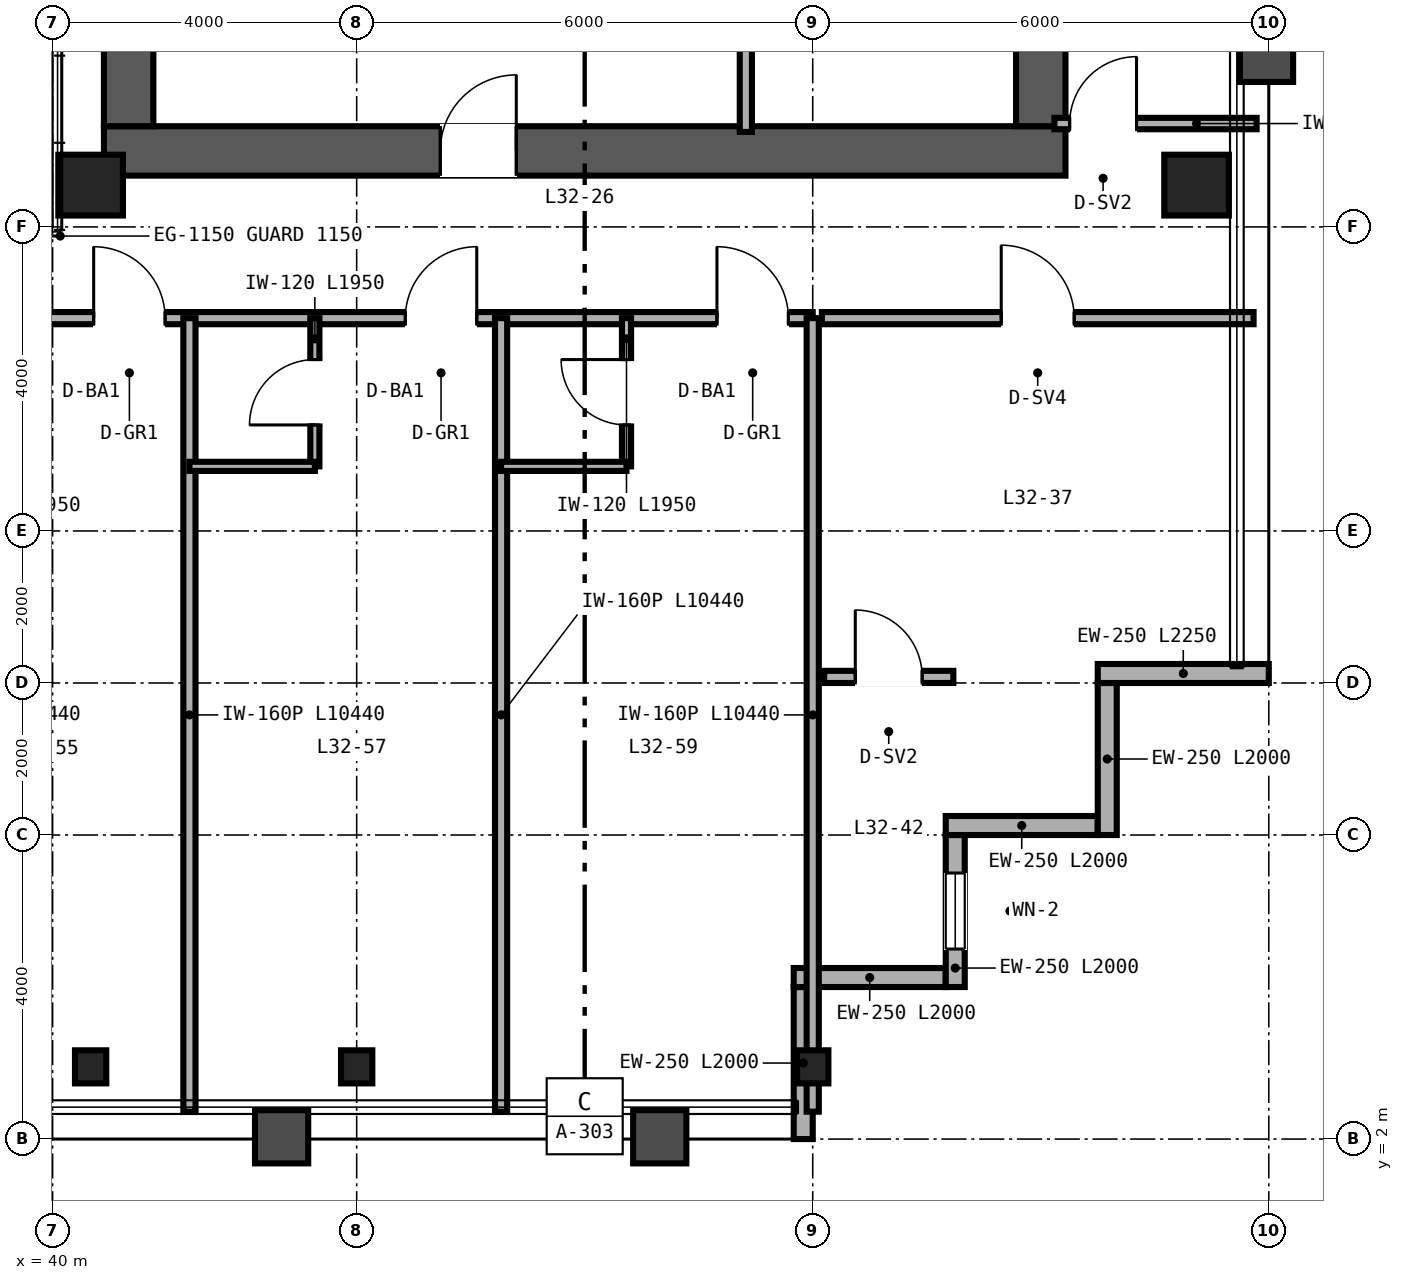
"""IFC4 building model, lengths in metres.
Left out: names, types, materials, properties, quantities, classifications, styles, units other than length and angle.
Written with IfcOpenShell. Run it as: python <this file> out.ifc"""

import sys

from ifc_helpers import new_model, si_unit, direction, frame, frame_2d, origin, origin_2d, place, context, subcontext, project, spatial, rectangle, hollow_rectangle, i_section, extrude, source, transform, mapped, element, fill, save


model = new_model("IFC4")
c1 = context("Model", 3, precision=1e-05, world=origin(), true_north=direction((0.0, 1.0)))
c2 = subcontext(c1, "Body", "Model", "MODEL_VIEW")
j1 = project(units=[si_unit("LENGTHUNIT", "METRE"), si_unit("PLANEANGLEUNIT", "RADIAN")], contexts=[c1])
p1 = place(None, origin())
s1 = spatial("IfcSite", under=j1, at=p1, CompositionType="ELEMENT")
p2 = place(p1, origin())
s2 = spatial("IfcBuilding", under=s1, at=p2, CompositionType="ELEMENT")
p3 = place(p2, frame((0.0, 0.0, 129.6)))
s3 = spatial("IfcBuildingStorey", under=s2, at=p3, CompositionType="ELEMENT", Elevation=129.6)
p4 = place(p3, frame((40.675, 15.0, 0.0), z_axis=(0.0, 0.0, 1.0), x_axis=(1.0, 0.0, 0.0)))
e1 = element("IfcWall", 1, at=p4, inside=s3, PredefinedType="SHEAR", context=c2, shape_type="SweptSolid", body=[
    extrude(rectangle(XDim=12.65, YDim=0.65, at=frame_2d((6.325, 0.0))), origin(), (0.0, 0.0, 1.0), 3.36),
])
p5 = place(p4, frame((4.425, 0.0, 0.0)))
e2 = element("IfcOpeningElement", 2, at=p5, cuts=e1, PredefinedType="OPENING", context=c2, shape_type="SweptSolid", body=[
    extrude(rectangle(XDim=1.0, YDim=2.15, at=frame_2d((0.5, 1.075))), frame((0.0, 0.335, 0.0), z_axis=(0.0, -1.0, 0.0), x_axis=(1.0, 0.0, 0.0)), (0.0, 0.0, 1.0), 0.67),
])
for number, where, z_axis, x_axis in (
    (3, (41.0, 15.325, 0.0), (0.0, 0.0, 1.0), (0.0, 1.0, 0.0)),
    (4, (53.0, 15.325, 0.0), (0.0, 0.0, 1.0), (0.0, 1.0, 0.0)),
):
    element("IfcWall", number, at=place(p3, frame(where, z_axis=z_axis, x_axis=x_axis)), inside=s3, PredefinedType="SHEAR", context=c2, shape_type="SweptSolid", body=[
        extrude(rectangle(XDim=21.35, YDim=0.65, at=frame_2d((10.675, 0.0))), origin(), (0.0, 0.0, 1.0), 3.36),
    ])
m1 = source(origin(), c2, "Body", "SweptSolid", [
    extrude(hollow_rectangle(XDim=0.85, YDim=0.8, WallThickness=0.032, at=origin_2d()), origin(), (0.0, 0.0, 1.0), 3.36),
])
for number, where, z_axis, x_axis in (
    (5, (40.5, 14.55, 0.0), (0.0, 0.0, 1.0), (1.0, 0.0, 0.0)),
    (6, (55.05, 14.55, 0.0), (0.0, 0.0, 1.0), (1.0, 0.0, 0.0)),
):
    element("IfcColumn", number, at=place(p3, frame(where, z_axis=z_axis, x_axis=x_axis)), inside=s3, PredefinedType="COLUMN", context=c2, shape_type="MappedRepresentation", body=[
        mapped(m1, transform((0.0, 0.0, 0.0), scale=1.0)),
    ])
m2 = source(origin(), c2, "Body", "SweptSolid", [
    extrude(i_section(OverallWidth=0.412, OverallDepth=0.435, WebThickness=0.036, FlangeThickness=0.057, FilletRadius=0.025, at=origin_2d()), origin(), (0.0, 0.0, 1.0), 3.36),
])
for number, where, z_axis, x_axis in (
    (7, (40.5, 2.95, 0.0), (0.0, 0.0, 1.0), (1.0, 0.0, 0.0)),
    (8, (44.0, 2.95, 0.0), (0.0, 0.0, 1.0), (1.0, 0.0, 0.0)),
    (9, (50.0, 2.95, 0.0), (0.0, 0.0, 1.0), (1.0, 0.0, 0.0)),
):
    element("IfcColumn", number, at=place(p3, frame(where, z_axis=z_axis, x_axis=x_axis)), inside=s3, PredefinedType="COLUMN", context=c2, shape_type="MappedRepresentation", body=[
        mapped(m2, transform((0.0, 0.0, 0.0), scale=1.0)),
    ])
p6 = place(p3, frame((49.875, 2.0, 0.0), z_axis=(0.0, 0.0, 1.0), x_axis=(0.0, 1.0, 0.0)))
e10 = element("IfcWall", 10, at=p6, inside=s3, PredefinedType="SOLIDWALL", context=c2, shape_type="SweptSolid", body=[
    extrude(rectangle(XDim=2.0, YDim=0.25, at=frame_2d((1.0, 0.0))), origin(), (0.0, 0.0, 1.0), 2.667),
])
p7 = place(p3, frame((49.75, 4.125, 0.0), z_axis=(0.0, 0.0, 1.0), x_axis=(1.0, 0.0, 0.0)))
e11 = element("IfcWall", 11, at=p7, inside=s3, PredefinedType="SOLIDWALL", context=c2, shape_type="SweptSolid", body=[
    extrude(rectangle(XDim=2.0, YDim=0.25, at=frame_2d((1.0, 0.0))), origin(), (0.0, 0.0, 1.0), 3.36),
])
p8 = place(p3, frame((51.875, 4.0, 0.0), z_axis=(0.0, 0.0, 1.0), x_axis=(0.0, 1.0, 0.0)))
e12 = element("IfcWall", 12, at=p8, inside=s3, PredefinedType="SOLIDWALL", context=c2, shape_type="SweptSolid", body=[
    extrude(rectangle(XDim=2.0, YDim=0.25, at=frame_2d((1.0, 0.0))), origin(), (0.0, 0.0, 1.0), 3.36),
])
p9 = place(p8, frame((0.5, 0.0, 0.85)))
e13 = element("IfcOpeningElement", 13, at=p9, cuts=e12, PredefinedType="OPENING", context=c2, shape_type="SweptSolid", body=[
    extrude(rectangle(XDim=1.0, YDim=1.9, at=frame_2d((0.5, 0.95))), frame((0.0, 0.135, 0.0), z_axis=(0.0, -1.0, 0.0), x_axis=(1.0, 0.0, 0.0)), (0.0, 0.0, 1.0), 0.27),
])
for number, where, z_axis, x_axis in (
    (14, (51.75, 6.125, 0.0), (0.0, 0.0, 1.0), (1.0, 0.0, 0.0)),
    (15, (53.875, 6.0, 0.0), (0.0, 0.0, 1.0), (0.0, 1.0, 0.0)),
):
    element("IfcWall", number, at=place(p3, frame(where, z_axis=z_axis, x_axis=x_axis)), inside=s3, PredefinedType="SOLIDWALL", context=c2, shape_type="SweptSolid", body=[
        extrude(rectangle(XDim=2.0, YDim=0.25, at=frame_2d((1.0, 0.0))), origin(), (0.0, 0.0, 1.0), 3.36),
    ])
p10 = place(p3, frame((53.75, 8.125, 0.0), z_axis=(0.0, 0.0, 1.0), x_axis=(1.0, 0.0, 0.0)))
e16 = element("IfcWall", 16, at=p10, inside=s3, PredefinedType="SOLIDWALL", context=c2, shape_type="SweptSolid", body=[
    extrude(rectangle(XDim=2.25, YDim=0.25, at=frame_2d((1.125, 0.0))), origin(), (0.0, 0.0, 1.0), 3.36),
])
p11 = place(p3, frame((49.12, 15.25, 0.0), z_axis=(0.0, 0.0, 1.0), x_axis=(0.0, 1.0, 0.0)))
e17 = element("IfcWall", 17, at=p11, inside=s3, PredefinedType="PARTITIONING", context=c2, shape_type="SweptSolid", body=[
    extrude(rectangle(XDim=16.13, YDim=0.16, at=frame_2d((8.065, 0.0))), origin(), (0.0, 0.0, 1.0), 2.36),
])
p12 = place(p11, frame((4.0, 0.0, 0.0)))
e18 = element("IfcOpeningElement", 18, at=p12, cuts=e17, PredefinedType="OPENING", context=c2, shape_type="SweptSolid", body=[
    extrude(rectangle(XDim=0.92, YDim=2.15, at=frame_2d((0.46, 1.075))), frame((0.0, 0.09, 0.0), z_axis=(0.0, -1.0, 0.0), x_axis=(1.0, 0.0, 0.0)), (0.0, 0.0, 1.0), 0.18),
])
p13 = place(p11, frame((12.0, 0.0, 0.0)))
e19 = element("IfcOpeningElement", 19, at=p13, cuts=e17, PredefinedType="OPENING", context=c2, shape_type="SweptSolid", body=[
    extrude(rectangle(XDim=0.92, YDim=2.15, at=frame_2d((0.46, 1.075))), frame((0.0, 0.09, 0.0), z_axis=(0.0, -1.0, 0.0), x_axis=(1.0, 0.0, 0.0)), (0.0, 0.0, 1.0), 0.18),
])
p14 = place(p3, frame((53.18, 15.36, 0.0), z_axis=(0.0, 0.0, 1.0), x_axis=(1.0, 0.0, 0.0)))
e20 = element("IfcWall", 20, at=p14, inside=s3, PredefinedType="PARTITIONING", context=c2, shape_type="SweptSolid", body=[
    extrude(rectangle(XDim=2.66, YDim=0.15, at=frame_2d((1.33, 0.0))), origin(), (0.0, 0.0, 1.0), 2.581),
])
p15 = place(p14, frame((0.2, 0.0, 0.0)))
e21 = element("IfcOpeningElement", 21, at=p15, cuts=e20, PredefinedType="OPENING", context=c2, shape_type="SweptSolid", body=[
    extrude(rectangle(XDim=0.88, YDim=2.15, at=frame_2d((0.44, 1.075))), frame((0.0, 0.085, 0.0), z_axis=(0.0, -1.0, 0.0), x_axis=(1.0, 0.0, 0.0)), (0.0, 0.0, 1.0), 0.17),
])
p16 = place(p3, frame((50.12, 12.8, 0.0), z_axis=(0.0, 0.0, 1.0), x_axis=(1.0, 0.0, 0.0)))
e22 = element("IfcWall", 22, at=p16, inside=s3, PredefinedType="PARTITIONING", context=c2, shape_type="SweptSolid", body=[
    extrude(rectangle(XDim=5.68, YDim=0.16, at=frame_2d((2.84, 0.0))), origin(), (0.0, 0.0, 1.0), 3.36),
])
p17 = place(p16, frame((2.36, 0.0, 0.0)))
e23 = element("IfcOpeningElement", 23, at=p17, cuts=e22, PredefinedType="OPENING", context=c2, shape_type="SweptSolid", body=[
    extrude(rectangle(XDim=0.96, YDim=2.15, at=frame_2d((0.48, 1.075))), frame((0.0, 0.09, 0.0), z_axis=(0.0, -1.0, 0.0), x_axis=(1.0, 0.0, 0.0)), (0.0, 0.0, 1.0), 0.18),
])
p18 = place(p3, frame((50.15, 8.08, 0.0), z_axis=(0.0, 0.0, 1.0), x_axis=(1.0, 0.0, 0.0)))
e24 = element("IfcWall", 24, at=p18, inside=s3, PredefinedType="PARTITIONING", context=c2, shape_type="SweptSolid", body=[
    extrude(rectangle(XDim=1.7, YDim=0.16, at=frame_2d((0.85, 0.0))), origin(), (0.0, 0.0, 1.0), 3.36),
])
p19 = place(p18, frame((0.41, 0.0, 0.0)))
e25 = element("IfcOpeningElement", 25, at=p19, cuts=e24, PredefinedType="OPENING", context=c2, shape_type="SweptSolid", body=[
    extrude(rectangle(XDim=0.88, YDim=2.15, at=frame_2d((0.44, 1.075))), frame((0.0, 0.09, 0.0), z_axis=(0.0, -1.0, 0.0), x_axis=(1.0, 0.0, 0.0)), (0.0, 0.0, 1.0), 0.18),
])
p20 = place(p3, frame((14.0, 12.8, 0.0), z_axis=(0.0, 0.0, 1.0), x_axis=(1.0, 0.0, 0.0)))
e26 = element("IfcWall", 26, at=p20, inside=s3, PredefinedType="PARTITIONING", context=c2, shape_type="SweptSolid", body=[
    extrude(rectangle(XDim=36.0, YDim=0.16, at=frame_2d((18.0, 0.0))), origin(), (0.0, 0.0, 1.0), 2.581),
])
p21 = place(p20, frame((2.64, 0.0, 0.0)))
e27 = element("IfcOpeningElement", 27, at=p21, cuts=e26, PredefinedType="OPENING", context=c2, shape_type="SweptSolid", body=[
    extrude(rectangle(XDim=0.94, YDim=2.15, at=frame_2d((0.47, 1.075))), frame((0.0, 0.09, 0.0), z_axis=(0.0, -1.0, 0.0), x_axis=(1.0, 0.0, 0.0)), (0.0, 0.0, 1.0), 0.18),
])
p22 = place(p20, frame((6.54, 0.0, 0.0)))
e28 = element("IfcOpeningElement", 28, at=p22, cuts=e26, PredefinedType="OPENING", context=c2, shape_type="SweptSolid", body=[
    extrude(rectangle(XDim=0.94, YDim=2.15, at=frame_2d((0.47, 1.075))), frame((0.0, 0.09, 0.0), z_axis=(0.0, -1.0, 0.0), x_axis=(1.0, 0.0, 0.0)), (0.0, 0.0, 1.0), 0.18),
])
p23 = place(p20, frame((10.54, 0.0, 0.0)))
e29 = element("IfcOpeningElement", 29, at=p23, cuts=e26, PredefinedType="OPENING", context=c2, shape_type="SweptSolid", body=[
    extrude(rectangle(XDim=0.94, YDim=2.15, at=frame_2d((0.47, 1.075))), frame((0.0, 0.09, 0.0), z_axis=(0.0, -1.0, 0.0), x_axis=(1.0, 0.0, 0.0)), (0.0, 0.0, 1.0), 0.18),
])
p24 = place(p20, frame((14.54, 0.0, 0.0)))
e30 = element("IfcOpeningElement", 30, at=p24, cuts=e26, PredefinedType="OPENING", context=c2, shape_type="SweptSolid", body=[
    extrude(rectangle(XDim=0.94, YDim=2.15, at=frame_2d((0.47, 1.075))), frame((0.0, 0.09, 0.0), z_axis=(0.0, -1.0, 0.0), x_axis=(1.0, 0.0, 0.0)), (0.0, 0.0, 1.0), 0.18),
])
p25 = place(p20, frame((18.54, 0.0, 0.0)))
e31 = element("IfcOpeningElement", 31, at=p25, cuts=e26, PredefinedType="OPENING", context=c2, shape_type="SweptSolid", body=[
    extrude(rectangle(XDim=0.94, YDim=2.15, at=frame_2d((0.47, 1.075))), frame((0.0, 0.09, 0.0), z_axis=(0.0, -1.0, 0.0), x_axis=(1.0, 0.0, 0.0)), (0.0, 0.0, 1.0), 0.18),
])
p26 = place(p20, frame((22.54, 0.0, 0.0)))
e32 = element("IfcOpeningElement", 32, at=p26, cuts=e26, PredefinedType="OPENING", context=c2, shape_type="SweptSolid", body=[
    extrude(rectangle(XDim=0.94, YDim=2.15, at=frame_2d((0.47, 1.075))), frame((0.0, 0.09, 0.0), z_axis=(0.0, -1.0, 0.0), x_axis=(1.0, 0.0, 0.0)), (0.0, 0.0, 1.0), 0.18),
])
p27 = place(p20, frame((26.54, 0.0, 0.0)))
e33 = element("IfcOpeningElement", 33, at=p27, cuts=e26, PredefinedType="OPENING", context=c2, shape_type="SweptSolid", body=[
    extrude(rectangle(XDim=0.94, YDim=2.15, at=frame_2d((0.47, 1.075))), frame((0.0, 0.09, 0.0), z_axis=(0.0, -1.0, 0.0), x_axis=(1.0, 0.0, 0.0)), (0.0, 0.0, 1.0), 0.18),
])
p28 = place(p20, frame((30.64, 0.0, 0.0)))
e34 = element("IfcOpeningElement", 34, at=p28, cuts=e26, PredefinedType="OPENING", context=c2, shape_type="SweptSolid", body=[
    extrude(rectangle(XDim=0.94, YDim=2.15, at=frame_2d((0.47, 1.075))), frame((0.0, 0.09, 0.0), z_axis=(0.0, -1.0, 0.0), x_axis=(1.0, 0.0, 0.0)), (0.0, 0.0, 1.0), 0.18),
])
p29 = place(p20, frame((34.74, 0.0, 0.0)))
e35 = element("IfcOpeningElement", 35, at=p29, cuts=e26, PredefinedType="OPENING", context=c2, shape_type="SweptSolid", body=[
    extrude(rectangle(XDim=0.94, YDim=2.15, at=frame_2d((0.47, 1.075))), frame((0.0, 0.09, 0.0), z_axis=(0.0, -1.0, 0.0), x_axis=(1.0, 0.0, 0.0)), (0.0, 0.0, 1.0), 0.18),
])
p30 = place(p3, frame((50.0, 2.36, 0.0), z_axis=(0.0, 0.0, 1.0), x_axis=(0.0, 1.0, 0.0)))
e36 = element("IfcWall", 36, at=p30, inside=s3, PredefinedType="PARTITIONING", context=c2, shape_type="SweptSolid", body=[
    extrude(rectangle(XDim=10.44, YDim=0.16, at=frame_2d((5.22, 0.0))), origin(), (0.0, 0.0, 1.0), 2.667),
])
p31 = place(p3, frame((41.8, 2.36, 0.0), z_axis=(0.0, 0.0, 1.0), x_axis=(0.0, 1.0, 0.0)))
e37 = element("IfcWall", 37, at=p31, inside=s3, PredefinedType="PARTITIONING", context=c2, shape_type="SweptSolid", body=[
    extrude(rectangle(XDim=10.44, YDim=0.16, at=frame_2d((5.22, 0.0))), origin(), (0.0, 0.0, 1.0), 2.823),
])
p32 = place(p3, frame((45.9, 2.36, 0.0), z_axis=(0.0, 0.0, 1.0), x_axis=(0.0, 1.0, 0.0)))
e38 = element("IfcWall", 38, at=p32, inside=s3, PredefinedType="PARTITIONING", context=c2, shape_type="SweptSolid", body=[
    extrude(rectangle(XDim=10.44, YDim=0.16, at=frame_2d((5.22, 0.0))), origin(), (0.0, 0.0, 1.0), 2.667),
])
p33 = place(p3, frame((43.45, 10.85, 0.0), z_axis=(0.0, 0.0, 1.0), x_axis=(0.0, 1.0, 0.0)))
e39 = element("IfcWall", 39, at=p33, inside=s3, PredefinedType="PARTITIONING", context=c2, shape_type="SweptSolid", body=[
    extrude(rectangle(XDim=1.95, YDim=0.12, at=frame_2d((0.975, 0.0))), origin(), (0.0, 0.0, 1.0), 3.36),
])
p34 = place(p33, frame((0.545, 0.0, 0.0)))
e40 = element("IfcOpeningElement", 40, at=p34, cuts=e39, PredefinedType="OPENING", context=c2, shape_type="SweptSolid", body=[
    extrude(rectangle(XDim=0.86, YDim=2.1, at=frame_2d((0.43, 1.05))), frame((0.0, 0.07, 0.0), z_axis=(0.0, -1.0, 0.0), x_axis=(1.0, 0.0, 0.0)), (0.0, 0.0, 1.0), 0.14),
])
p35 = place(p3, frame((41.8, 10.85, 0.0), z_axis=(0.0, 0.0, 1.0), x_axis=(1.0, 0.0, 0.0)))
e41 = element("IfcWall", 41, at=p35, inside=s3, PredefinedType="PARTITIONING", context=c2, shape_type="SweptSolid", body=[
    extrude(rectangle(XDim=1.65, YDim=0.12, at=frame_2d((0.825, 0.0))), origin(), (0.0, 0.0, 1.0), 3.36),
])
p36 = place(p3, frame((47.55, 10.85, 0.0), z_axis=(0.0, 0.0, 1.0), x_axis=(0.0, 1.0, 0.0)))
e42 = element("IfcWall", 42, at=p36, inside=s3, PredefinedType="PARTITIONING", context=c2, shape_type="SweptSolid", body=[
    extrude(rectangle(XDim=1.95, YDim=0.12, at=frame_2d((0.975, 0.0))), origin(), (0.0, 0.0, 1.0), 3.36),
])
p37 = place(p36, frame((0.545, 0.0, 0.0)))
e43 = element("IfcOpeningElement", 43, at=p37, cuts=e42, PredefinedType="OPENING", context=c2, shape_type="SweptSolid", body=[
    extrude(rectangle(XDim=0.86, YDim=2.1, at=frame_2d((0.43, 1.05))), frame((0.0, 0.07, 0.0), z_axis=(0.0, -1.0, 0.0), x_axis=(1.0, 0.0, 0.0)), (0.0, 0.0, 1.0), 0.14),
])
p38 = place(p3, frame((45.9, 10.85, 0.0), z_axis=(0.0, 0.0, 1.0), x_axis=(1.0, 0.0, 0.0)))
e44 = element("IfcWall", 44, at=p38, inside=s3, PredefinedType="PARTITIONING", context=c2, shape_type="SweptSolid", body=[
    extrude(rectangle(XDim=1.65, YDim=0.12, at=frame_2d((0.825, 0.0))), origin(), (0.0, 0.0, 1.0), 3.36),
])
m3 = source(origin(), c2, "Body", "SweptSolid", [
    extrude(rectangle(XDim=1.0, YDim=1.9, at=frame_2d((0.5, 0.95))), frame((0.0, 0.03, 0.0), z_axis=(0.0, -1.0, 0.0), x_axis=(1.0, 0.0, 0.0)), (0.0, 0.0, 1.0), 0.06),
])
p39 = place(p9, origin())
e45 = element("IfcWindow", 45, at=p39, inside=s3, PartitioningType="SINGLE_PANEL", PredefinedType="WINDOW", context=c2, shape_type="MappedRepresentation", body=[
    mapped(m3, transform((0.0, 0.0, 0.0), scale=1.0)),
])
fill(e13, e45)
m4 = source(origin(), c2, "Body", "SweptSolid", [
    extrude(rectangle(XDim=1.0, YDim=2.15, at=frame_2d((0.5, 1.075))), frame((0.0, 0.025, 0.0), z_axis=(0.0, -1.0, 0.0), x_axis=(1.0, 0.0, 0.0)), (0.0, 0.0, 1.0), 0.05),
])
p40 = place(p5, origin())
e46 = element("IfcDoor", 46, at=p40, inside=s3, OperationType="SINGLE_SWING_RIGHT", PredefinedType="DOOR", context=c2, shape_type="MappedRepresentation", body=[
    mapped(m4, transform((0.0, 0.0, 0.0), scale=1.0)),
])
fill(e2, e46)
m5 = source(origin(), c2, "Body", "SweptSolid", [
    extrude(rectangle(XDim=0.88, YDim=2.15, at=frame_2d((0.44, 1.075))), frame((0.0, 0.025, 0.0), z_axis=(0.0, -1.0, 0.0), x_axis=(1.0, 0.0, 0.0)), (0.0, 0.0, 1.0), 0.05),
])
p41 = place(p15, origin())
e47 = element("IfcDoor", 47, at=p41, inside=s3, OperationType="SINGLE_SWING_RIGHT", PredefinedType="DOOR", context=c2, shape_type="MappedRepresentation", body=[
    mapped(m5, transform((0.0, 0.0, 0.0), scale=1.0)),
])
fill(e21, e47)
m6 = source(origin(), c2, "Body", "SweptSolid", [
    extrude(rectangle(XDim=0.96, YDim=2.15, at=frame_2d((0.48, 1.075))), frame((0.0, 0.025, 0.0), z_axis=(0.0, -1.0, 0.0), x_axis=(1.0, 0.0, 0.0)), (0.0, 0.0, 1.0), 0.05),
])
p42 = place(p17, origin())
e48 = element("IfcDoor", 48, at=p42, inside=s3, OperationType="SINGLE_SWING_LEFT", PredefinedType="DOOR", context=c2, shape_type="MappedRepresentation", body=[
    mapped(m6, transform((0.0, 0.0, 0.0), scale=1.0)),
])
fill(e23, e48)
p43 = place(p19, origin())
e49 = element("IfcDoor", 49, at=p43, inside=s3, OperationType="SINGLE_SWING_LEFT", PredefinedType="DOOR", context=c2, shape_type="MappedRepresentation", body=[
    mapped(m5, transform((0.0, 0.0, 0.0), scale=1.0)),
])
fill(e25, e49)
m7 = source(origin(), c2, "Body", "SweptSolid", [
    extrude(rectangle(XDim=0.86, YDim=2.1, at=frame_2d((0.43, 1.05))), frame((0.0, 0.025, 0.0), z_axis=(0.0, -1.0, 0.0), x_axis=(1.0, 0.0, 0.0)), (0.0, 0.0, 1.0), 0.05),
])
p44 = place(p34, origin())
e50 = element("IfcDoor", 50, at=p44, inside=s3, OperationType="SINGLE_SWING_LEFT", PredefinedType="DOOR", context=c2, shape_type="MappedRepresentation", body=[
    mapped(m7, transform((0.0, 0.0, 0.0), scale=1.0)),
])
fill(e40, e50)
p45 = place(p37, origin())
e51 = element("IfcDoor", 51, at=p45, inside=s3, OperationType="SINGLE_SWING_RIGHT", PredefinedType="DOOR", context=c2, shape_type="MappedRepresentation", body=[
    mapped(m7, transform((0.0, 0.0, 0.0), scale=1.0)),
])
fill(e43, e51)
m8 = source(origin(), c2, "Body", "SweptSolid", [
    extrude(rectangle(XDim=0.94, YDim=2.15, at=frame_2d((0.47, 1.075))), frame((0.0, 0.025, 0.0), z_axis=(0.0, -1.0, 0.0), x_axis=(1.0, 0.0, 0.0)), (0.0, 0.0, 1.0), 0.05),
])
p46 = place(p27, origin())
e52 = element("IfcDoor", 52, at=p46, inside=s3, OperationType="SINGLE_SWING_LEFT", PredefinedType="DOOR", context=c2, shape_type="MappedRepresentation", body=[
    mapped(m8, transform((0.0, 0.0, 0.0), scale=1.0)),
])
fill(e33, e52)
p47 = place(p28, origin())
e53 = element("IfcDoor", 53, at=p47, inside=s3, OperationType="SINGLE_SWING_RIGHT", PredefinedType="DOOR", context=c2, shape_type="MappedRepresentation", body=[
    mapped(m8, transform((0.0, 0.0, 0.0), scale=1.0)),
])
fill(e34, e53)
p48 = place(p29, origin())
e54 = element("IfcDoor", 54, at=p48, inside=s3, OperationType="SINGLE_SWING_LEFT", PredefinedType="DOOR", context=c2, shape_type="MappedRepresentation", body=[
    mapped(m8, transform((0.0, 0.0, 0.0), scale=1.0)),
])
fill(e35, e54)
save(model, sys.argv[1])
